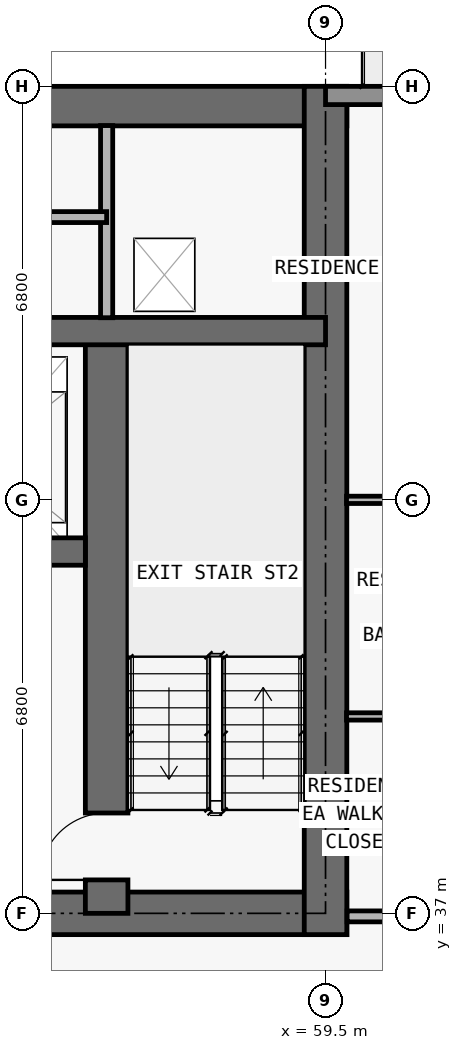
"""IFC4 building model, lengths in metres.
Left out: names, types, materials, properties, quantities, classifications, styles, units other than length and angle.
Written with IfcOpenShell. Run it as: python <this file> out.ifc"""

import sys

from ifc_helpers import new_model, si_unit, direction, frame, frame_2d, origin, place, context, subcontext, project, spatial, rectangle, extrude, element, fill, save


model = new_model("IFC4")
c1 = context("Model", 3, precision=1e-05, world=origin(), true_north=direction((0.0, 1.0)))
c2 = subcontext(c1, "Body", "Model", "MODEL_VIEW")
j1 = project(units=[si_unit("LENGTHUNIT", "METRE"), si_unit("PLANEANGLEUNIT", "RADIAN")], contexts=[c1])
p1 = place(None, origin())
s1 = spatial("IfcSite", under=j1, at=p1, CompositionType="ELEMENT")
p2 = place(p1, origin())
s2 = spatial("IfcBuilding", under=s1, at=p2, CompositionType="ELEMENT")
p3 = place(p2, frame((0.0, 0.0, 180.3)))
s3 = spatial("IfcBuildingStorey", under=s2, at=p3, CompositionType="ELEMENT", Elevation=180.3)
p4 = place(p3, frame((17.95, 37.0, 0.0), z_axis=(0.0, 0.0, 1.0), x_axis=(1.0, 0.0, 0.0)))
e1 = element("IfcWall", 1, at=p4, inside=s3, PredefinedType="SHEAR", context=c2, shape_type="SweptSolid", body=[
    extrude(rectangle(XDim=41.9, YDim=0.7, at=frame_2d((20.95, 0.0))), origin(), (0.0, 0.0, 1.0), 3.0),
])
p5 = place(p4, frame((14.35, 0.0, 0.0)))
e2 = element("IfcOpeningElement", 2, at=p5, cuts=e1, PredefinedType="OPENING", context=c2, shape_type="SweptSolid", body=[
    extrude(rectangle(XDim=1.1, YDim=2.15, at=frame_2d((0.55, 1.075))), frame((0.0, 0.36, 0.0), z_axis=(0.0, -1.0, 0.0), x_axis=(1.0, 0.0, 0.0)), (0.0, 0.0, 1.0), 0.72),
])
p6 = place(p4, frame((6.2, 0.0, 0.0)))
e3 = element("IfcOpeningElement", 3, at=p6, cuts=e1, PredefinedType="OPENING", context=c2, shape_type="SweptSolid", body=[
    extrude(rectangle(XDim=1.05, YDim=2.15, at=frame_2d((0.525, 1.075))), frame((0.0, 0.36, 0.0), z_axis=(0.0, -1.0, 0.0), x_axis=(1.0, 0.0, 0.0)), (0.0, 0.0, 1.0), 0.72),
])
p7 = place(p4, frame((34.7, 0.0, 0.0)))
e4 = element("IfcOpeningElement", 4, at=p7, cuts=e1, PredefinedType="OPENING", context=c2, shape_type="SweptSolid", body=[
    extrude(rectangle(XDim=1.05, YDim=2.15, at=frame_2d((0.525, 1.075))), frame((0.0, 0.36, 0.0), z_axis=(0.0, -1.0, 0.0), x_axis=(1.0, 0.0, 0.0)), (0.0, 0.0, 1.0), 0.72),
])
p8 = place(p4, frame((10.812, 0.0, 0.0)))
e5 = element("IfcOpeningElement", 5, at=p8, cuts=e1, PredefinedType="OPENING", context=c2, shape_type="SweptSolid", body=[
    extrude(rectangle(XDim=1.05, YDim=2.15, at=frame_2d((0.525, 1.075))), frame((0.0, 0.36, 0.0), z_axis=(0.0, -1.0, 0.0), x_axis=(1.0, 0.0, 0.0)), (0.0, 0.0, 1.0), 0.72),
])
p9 = place(p4, frame((24.05, 0.0, 0.0)))
e6 = element("IfcOpeningElement", 6, at=p9, cuts=e1, PredefinedType="OPENING", context=c2, shape_type="SweptSolid", body=[
    extrude(rectangle(XDim=1.05, YDim=2.15, at=frame_2d((0.525, 1.075))), frame((0.0, 0.36, 0.0), z_axis=(0.0, -1.0, 0.0), x_axis=(1.0, 0.0, 0.0)), (0.0, 0.0, 1.0), 0.72),
])
p10 = place(p3, frame((17.95, 50.275, 0.0), z_axis=(0.0, 0.0, 1.0), x_axis=(1.0, 0.0, 0.0)))
e7 = element("IfcWall", 7, at=p10, inside=s3, PredefinedType="SHEAR", context=c2, shape_type="SweptSolid", body=[
    extrude(rectangle(XDim=41.9, YDim=0.65, at=frame_2d((20.95, 0.0))), origin(), (0.0, 0.0, 1.0), 3.0),
])
p11 = place(p3, frame((59.5, 36.65, 0.0), z_axis=(0.0, 0.0, 1.0), x_axis=(0.0, 1.0, 0.0)))
e8 = element("IfcWall", 8, at=p11, inside=s3, PredefinedType="SHEAR", context=c2, shape_type="SweptSolid", body=[
    extrude(rectangle(XDim=13.95, YDim=0.7, at=frame_2d((6.975, 0.0))), origin(), (0.0, 0.0, 1.0), 3.0),
])
p12 = place(p3, frame((55.9, 37.0, 0.0), z_axis=(0.0, 0.0, 1.0), x_axis=(0.0, 1.0, 0.0)))
e9 = element("IfcWall", 9, at=p12, inside=s3, PredefinedType="SHEAR", context=c2, shape_type="SweptSolid", body=[
    extrude(rectangle(XDim=9.575, YDim=0.7, at=frame_2d((4.788, 0.0))), origin(), (0.0, 0.0, 1.0), 3.0),
])
p13 = place(p12, frame((0.55, 0.0, 0.0)))
e10 = element("IfcOpeningElement", 10, at=p13, cuts=e9, PredefinedType="OPENING", context=c2, shape_type="SweptSolid", body=[
    extrude(rectangle(XDim=1.1, YDim=2.15, at=frame_2d((0.55, 1.075))), frame((0.0, 0.36, 0.0), z_axis=(0.0, -1.0, 0.0), x_axis=(1.0, 0.0, 0.0)), (0.0, 0.0, 1.0), 0.72),
])
p14 = place(p3, frame((22.25, 42.95, 0.0), z_axis=(0.0, 0.0, 1.0), x_axis=(1.0, 0.0, 0.0)))
e11 = element("IfcWall", 11, at=p14, inside=s3, PredefinedType="SHEAR", context=c2, shape_type="SweptSolid", body=[
    extrude(rectangle(XDim=33.3, YDim=0.45, at=frame_2d((16.65, 0.0))), origin(), (0.0, 0.0, 1.0), 3.0),
])
p15 = place(p14, frame((1.05, 0.0, 0.0)))
e12 = element("IfcOpeningElement", 12, at=p15, cuts=e11, PredefinedType="OPENING", context=c2, shape_type="SweptSolid", body=[
    extrude(rectangle(XDim=1.2, YDim=2.2, at=frame_2d((0.6, 1.1))), frame((0.0, 0.235, 0.0), z_axis=(0.0, -1.0, 0.0), x_axis=(1.0, 0.0, 0.0)), (0.0, 0.0, 1.0), 0.47),
])
p16 = place(p14, frame((31.05, 0.0, 0.0)))
e13 = element("IfcOpeningElement", 13, at=p16, cuts=e11, PredefinedType="OPENING", context=c2, shape_type="SweptSolid", body=[
    extrude(rectangle(XDim=1.2, YDim=2.2, at=frame_2d((0.6, 1.1))), frame((0.0, 0.235, 0.0), z_axis=(0.0, -1.0, 0.0), x_axis=(1.0, 0.0, 0.0)), (0.0, 0.0, 1.0), 0.47),
])
p17 = place(p14, frame((21.4, 0.0, 0.0)))
e14 = element("IfcOpeningElement", 14, at=p17, cuts=e11, PredefinedType="OPENING", context=c2, shape_type="SweptSolid", body=[
    extrude(rectangle(XDim=1.1, YDim=2.2, at=frame_2d((0.55, 1.1))), frame((0.0, 0.235, 0.0), z_axis=(0.0, -1.0, 0.0), x_axis=(1.0, 0.0, 0.0)), (0.0, 0.0, 1.0), 0.47),
])
p18 = place(p14, frame((24.0, 0.0, 0.0)))
e15 = element("IfcOpeningElement", 15, at=p18, cuts=e11, PredefinedType="OPENING", context=c2, shape_type="SweptSolid", body=[
    extrude(rectangle(XDim=1.1, YDim=2.2, at=frame_2d((0.55, 1.1))), frame((0.0, 0.235, 0.0), z_axis=(0.0, -1.0, 0.0), x_axis=(1.0, 0.0, 0.0)), (0.0, 0.0, 1.0), 0.47),
])
p19 = place(p14, frame((3.625, 0.0, 0.0)))
e16 = element("IfcOpeningElement", 16, at=p19, cuts=e11, PredefinedType="OPENING", context=c2, shape_type="SweptSolid", body=[
    extrude(rectangle(XDim=1.05, YDim=2.15, at=frame_2d((0.525, 1.075))), frame((0.0, 0.235, 0.0), z_axis=(0.0, -1.0, 0.0), x_axis=(1.0, 0.0, 0.0)), (0.0, 0.0, 1.0), 0.47),
])
p20 = place(p14, frame((28.675, 0.0, 0.0)))
e17 = element("IfcOpeningElement", 17, at=p20, cuts=e11, PredefinedType="OPENING", context=c2, shape_type="SweptSolid", body=[
    extrude(rectangle(XDim=1.05, YDim=2.15, at=frame_2d((0.525, 1.075))), frame((0.0, 0.235, 0.0), z_axis=(0.0, -1.0, 0.0), x_axis=(1.0, 0.0, 0.0)), (0.0, 0.0, 1.0), 0.47),
])
p21 = place(p14, frame((15.975, 0.0, 0.0)))
e18 = element("IfcOpeningElement", 18, at=p21, cuts=e11, PredefinedType="OPENING", context=c2, shape_type="SweptSolid", body=[
    extrude(rectangle(XDim=1.0, YDim=2.2, at=frame_2d((0.5, 1.1))), frame((0.0, 0.235, 0.0), z_axis=(0.0, -1.0, 0.0), x_axis=(1.0, 0.0, 0.0)), (0.0, 0.0, 1.0), 0.47),
])
p22 = place(p3, frame((18.3, 46.575, 0.0), z_axis=(0.0, 0.0, 1.0), x_axis=(1.0, 0.0, 0.0)))
e19 = element("IfcWall", 19, at=p22, inside=s3, PredefinedType="SHEAR", context=c2, shape_type="SweptSolid", body=[
    extrude(rectangle(XDim=41.2, YDim=0.45, at=frame_2d((20.6, 0.0))), origin(), (0.0, 0.0, 1.0), 3.0),
])
p23 = place(p22, frame((7.6, 0.0, 0.0)))
e20 = element("IfcOpeningElement", 20, at=p23, cuts=e19, PredefinedType="OPENING", context=c2, shape_type="SweptSolid", body=[
    extrude(rectangle(XDim=1.0, YDim=2.2, at=frame_2d((0.5, 1.1))), frame((0.0, 0.235, 0.0), z_axis=(0.0, -1.0, 0.0), x_axis=(1.0, 0.0, 0.0)), (0.0, 0.0, 1.0), 0.47),
])
p24 = place(p22, frame((32.625, 0.0, 0.0)))
e21 = element("IfcOpeningElement", 21, at=p24, cuts=e19, PredefinedType="OPENING", context=c2, shape_type="SweptSolid", body=[
    extrude(rectangle(XDim=1.05, YDim=2.15, at=frame_2d((0.525, 1.075))), frame((0.0, 0.235, 0.0), z_axis=(0.0, -1.0, 0.0), x_axis=(1.0, 0.0, 0.0)), (0.0, 0.0, 1.0), 0.47),
])
p25 = place(p3, frame((59.5, 50.45, 0.0), z_axis=(0.0, 0.0, 1.0), x_axis=(1.0, 0.0, 0.0)))
e22 = element("IfcWall", 22, at=p25, inside=s3, PredefinedType="STANDARD", context=c2, shape_type="SweptSolid", body=[
    extrude(rectangle(XDim=8.2, YDim=0.3, at=frame_2d((4.1, 0.0))), origin(), (0.0, 0.0, 1.0), 3.0),
])
p26 = place(p25, frame((3.1, 0.0, 0.0)))
e23 = element("IfcOpeningElement", 23, at=p26, cuts=e22, PredefinedType="OPENING", context=c2, shape_type="SweptSolid", body=[
    extrude(rectangle(XDim=2.0, YDim=2.3, at=frame_2d((1.0, 1.15))), frame((0.0, 0.16, 0.0), z_axis=(0.0, -1.0, 0.0), x_axis=(1.0, 0.0, 0.0)), (0.0, 0.0, 1.0), 0.32),
])
p27 = place(p3, frame((55.9, 46.795, 0.0), z_axis=(0.0, 0.0, 1.0), x_axis=(0.0, 1.0, 0.0)))
e24 = element("IfcWall", 24, at=p27, inside=s3, PredefinedType="PARTITIONING", context=c2, shape_type="SweptSolid", body=[
    extrude(rectangle(XDim=3.16, YDim=0.2, at=frame_2d((1.58, 0.0))), origin(), (0.0, 0.0, 1.0), 3.0),
])
p28 = place(p3, frame((59.855, 36.95, 0.0), z_axis=(0.0, 0.0, 1.0), x_axis=(1.0, 0.0, 0.0)))
e25 = element("IfcWall", 25, at=p28, inside=s3, PredefinedType="PARTITIONING", context=c2, shape_type="SweptSolid", body=[
    extrude(rectangle(XDim=5.425, YDim=0.18, at=frame_2d((2.712, 0.0))), origin(), (0.0, 0.0, 1.0), 3.0),
])
p29 = place(p28, frame((3.385, 0.0, 0.0)))
e26 = element("IfcOpeningElement", 26, at=p29, cuts=e25, PredefinedType="OPENING", context=c2, shape_type="SweptSolid", body=[
    extrude(rectangle(XDim=1.0, YDim=2.2, at=frame_2d((0.5, 1.1))), frame((0.0, 0.1, 0.0), z_axis=(0.0, -1.0, 0.0), x_axis=(1.0, 0.0, 0.0)), (0.0, 0.0, 1.0), 0.2),
])
p30 = place(p3, frame((59.845, 40.238, 0.0), z_axis=(0.0, 0.0, 1.0), x_axis=(1.0, 0.0, 0.0)))
e27 = element("IfcWall", 27, at=p30, inside=s3, PredefinedType="PARTITIONING", context=c2, shape_type="SweptSolid", body=[
    extrude(rectangle(XDim=2.355, YDim=0.12, at=frame_2d((1.177, 0.0))), origin(), (0.0, 0.0, 1.0), 3.0),
])
p31 = place(p3, frame((59.845, 43.8, 0.0), z_axis=(0.0, 0.0, 1.0), x_axis=(1.0, 0.0, 0.0)))
e28 = element("IfcWall", 28, at=p31, inside=s3, PredefinedType="PARTITIONING", context=c2, shape_type="SweptSolid", body=[
    extrude(rectangle(XDim=5.435, YDim=0.12, at=frame_2d((2.718, 0.0))), origin(), (0.0, 0.0, 1.0), 2.368),
])
p32 = place(p31, frame((3.445, 0.0, 0.0)))
e29 = element("IfcOpeningElement", 29, at=p32, cuts=e28, PredefinedType="OPENING", context=c2, shape_type="SweptSolid", body=[
    extrude(rectangle(XDim=0.9, YDim=2.15, at=frame_2d((0.45, 1.075))), frame((0.0, 0.07, 0.0), z_axis=(0.0, -1.0, 0.0), x_axis=(1.0, 0.0, 0.0)), (0.0, 0.0, 1.0), 0.14),
])
p33 = place(p31, frame((0.752, 0.0, 0.0)))
e30 = element("IfcOpeningElement", 30, at=p33, cuts=e28, PredefinedType="OPENING", context=c2, shape_type="SweptSolid", body=[
    extrude(rectangle(XDim=0.85, YDim=2.1, at=frame_2d((0.425, 1.05))), frame((0.0, 0.07, 0.0), z_axis=(0.0, -1.0, 0.0), x_axis=(1.0, 0.0, 0.0)), (0.0, 0.0, 1.0), 0.14),
])
p34 = place(p3, frame((41.2, 48.45, 0.0), z_axis=(0.0, 0.0, 1.0), x_axis=(1.0, 0.0, 0.0)))
e31 = element("IfcWall", 31, at=p34, inside=s3, PredefinedType="PARTITIONING", context=c2, shape_type="SweptSolid", body=[
    extrude(rectangle(XDim=14.7, YDim=0.18, at=frame_2d((7.35, 0.0))), origin(), (0.0, 0.0, 1.0), 3.0),
])
p35 = place(p34, frame((1.85, 0.0, 0.0)))
e32 = element("IfcOpeningElement", 32, at=p35, cuts=e31, PredefinedType="OPENING", context=c2, shape_type="SweptSolid", body=[
    extrude(rectangle(XDim=1.2, YDim=2.2, at=frame_2d((0.6, 1.1))), frame((0.0, 0.1, 0.0), z_axis=(0.0, -1.0, 0.0), x_axis=(1.0, 0.0, 0.0)), (0.0, 0.0, 1.0), 0.2),
])
p36 = place(p34, frame((6.75, 0.0, 0.0)))
e33 = element("IfcOpeningElement", 33, at=p36, cuts=e31, PredefinedType="OPENING", context=c2, shape_type="SweptSolid", body=[
    extrude(rectangle(XDim=1.2, YDim=2.2, at=frame_2d((0.6, 1.1))), frame((0.0, 0.1, 0.0), z_axis=(0.0, -1.0, 0.0), x_axis=(1.0, 0.0, 0.0)), (0.0, 0.0, 1.0), 0.2),
])
p37 = place(p34, frame((11.825, 0.0, 0.0)))
e34 = element("IfcOpeningElement", 34, at=p37, cuts=e31, PredefinedType="OPENING", context=c2, shape_type="SweptSolid", body=[
    extrude(rectangle(XDim=0.85, YDim=2.1, at=frame_2d((0.425, 1.05))), frame((0.0, 0.1, 0.0), z_axis=(0.0, -1.0, 0.0), x_axis=(1.0, 0.0, 0.0)), (0.0, 0.0, 1.0), 0.2),
])
p38 = place(p13, origin())
e35 = element("IfcDoor", 35, at=p38, inside=s3, OperationType="SINGLE_SWING_LEFT", PredefinedType="DOOR", context=c2, shape_type="SweptSolid", body=[
    extrude(rectangle(XDim=1.1, YDim=2.15, at=frame_2d((0.55, 1.075))), frame((0.0, 0.025, 0.0), z_axis=(0.0, -1.0, 0.0), x_axis=(1.0, 0.0, 0.0)), (0.0, 0.0, 1.0), 0.05),
])
fill(e10, e35)
save(model, sys.argv[1])
